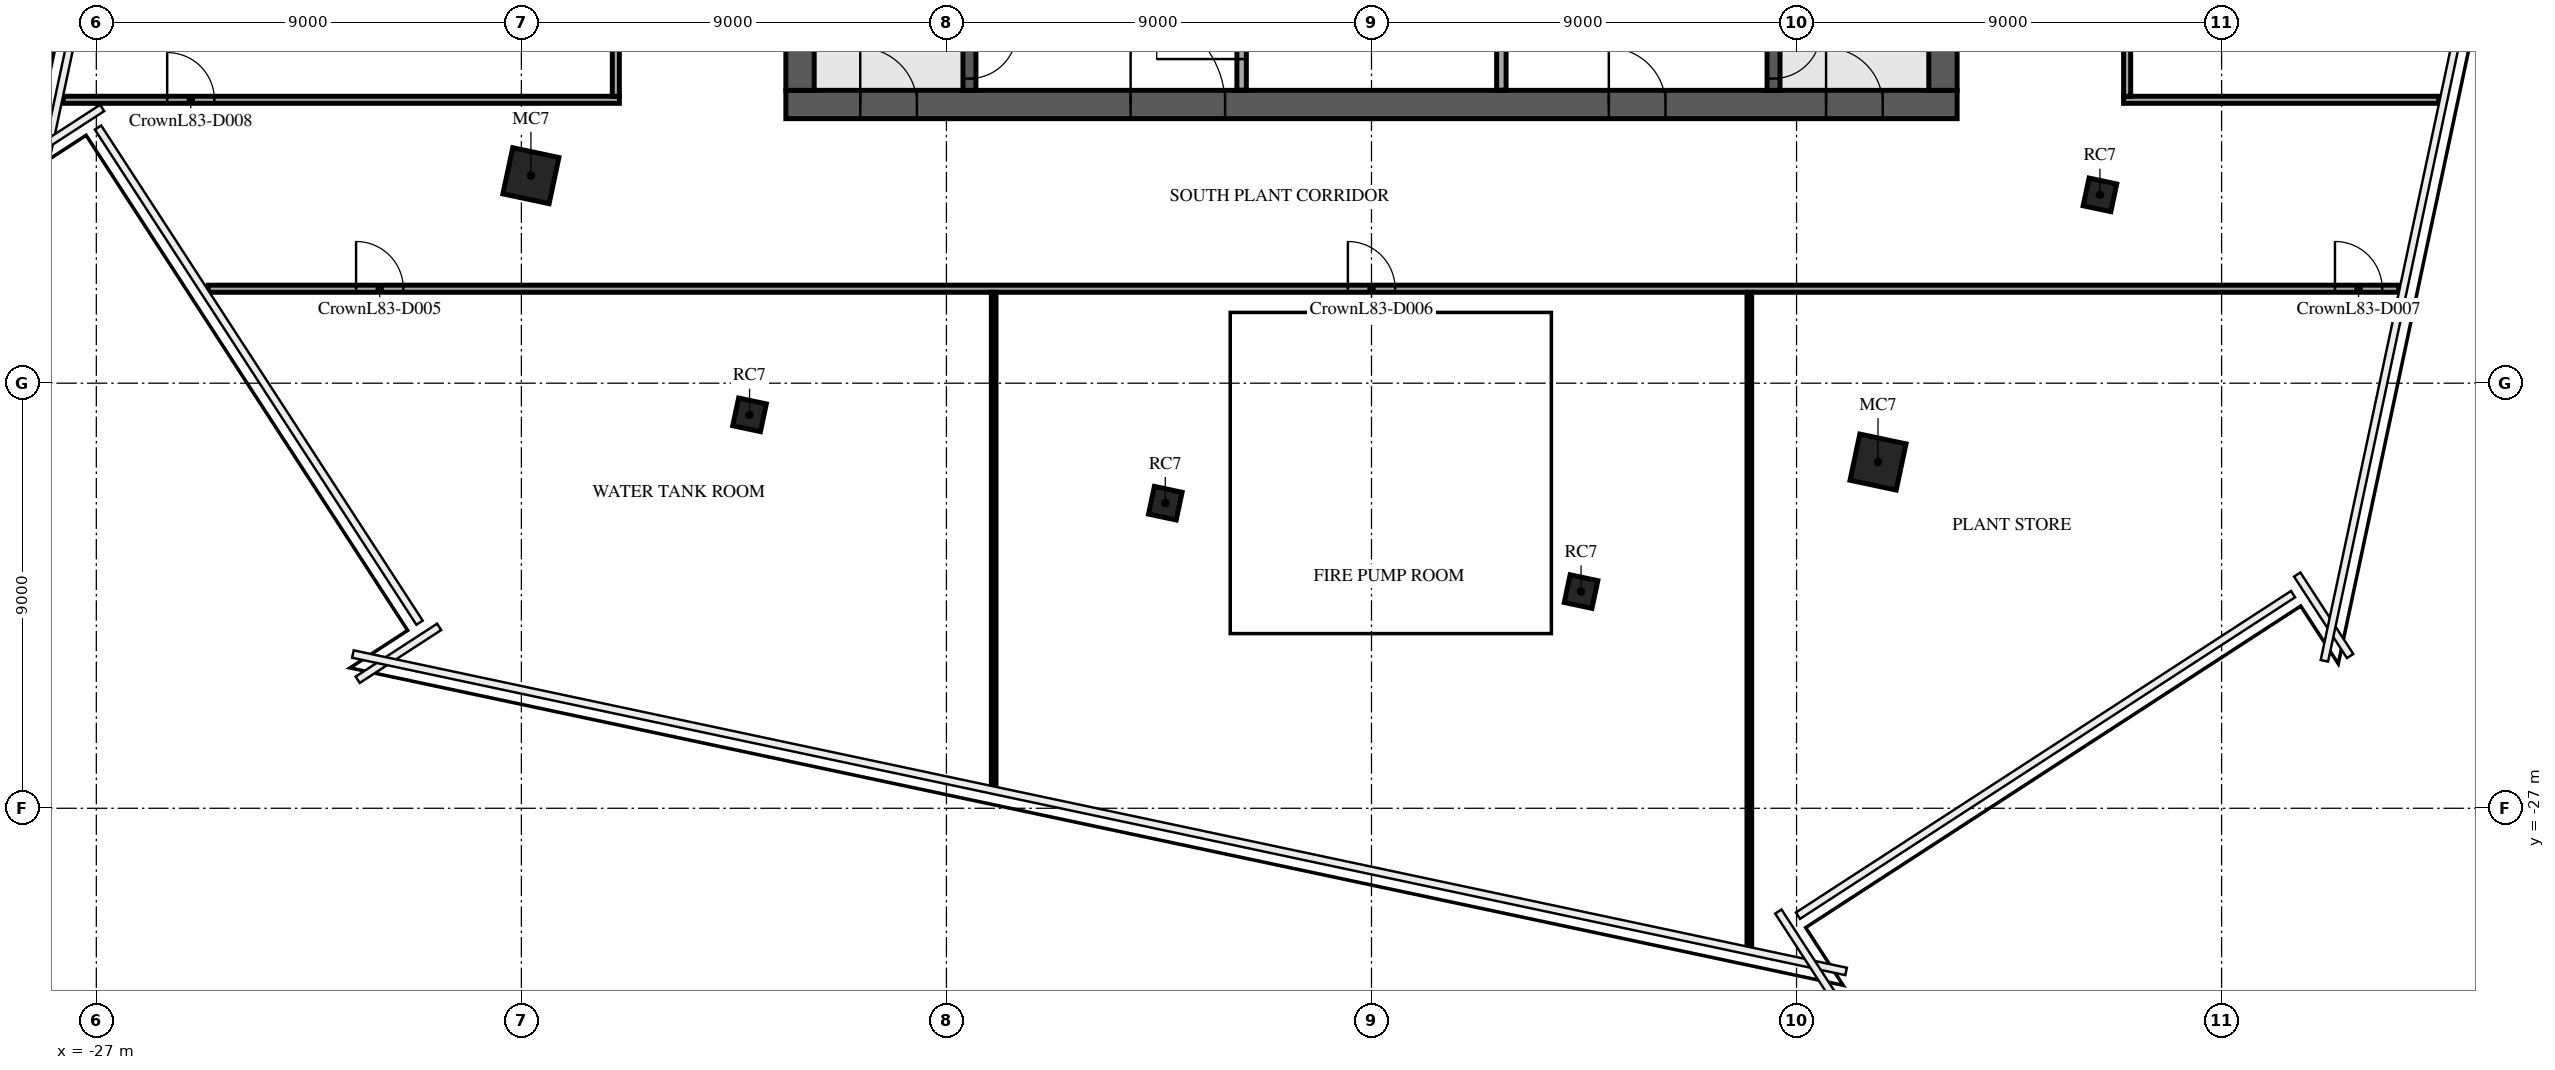
"""IFC4 building model, lengths in metres.
Left out: names, types, materials, properties, quantities, classifications, styles, units other than length and angle.
Written with IfcOpenShell. Run it as: python <this file> out.ifc"""

import sys

from ifc_helpers import new_model, si_unit, direction, frame, frame_2d, origin, origin_2d, place, context, subcontext, project, spatial, rectangle, extrude, element, fill, save


model = new_model("IFC4")
c1 = context("Model", 3, precision=1e-05, world=origin(), true_north=direction((0.0, 1.0)))
c2 = subcontext(c1, "Body", "Model", "MODEL_VIEW")
j1 = project(units=[si_unit("LENGTHUNIT", "METRE"), si_unit("PLANEANGLEUNIT", "RADIAN")], contexts=[c1])
p1 = place(None, origin())
s1 = spatial("IfcSite", under=j1, at=p1, CompositionType="ELEMENT")
p2 = place(p1, origin())
s2 = spatial("IfcBuilding", under=s1, at=p2, CompositionType="ELEMENT")
p3 = place(p2, frame((0.0, 0.0, 350.1)))
s3 = spatial("IfcBuildingStorey", under=s2, at=p3, CompositionType="ELEMENT", Elevation=350.1)
p4 = place(p3, frame((-17.798, -13.607, -0.3), z_axis=(0.0, 0.0, 1.0), x_axis=(0.207911690818, 0.978147600734, 0.0)))
e1 = element("IfcColumn", 1, at=p4, inside=s3, PredefinedType="COLUMN", context=c2, shape_type="SweptSolid", body=[
    extrude(rectangle(XDim=1.0, YDim=1.0, at=origin_2d()), origin(), (0.0, 0.0, 1.0), 8.3),
])
for number, where, z_axis, x_axis in (
    (2, (-13.169, -18.67, -0.3), (0.0, 0.0, 1.0), (0.208, 0.978, 0.0)),
    (3, (-4.366, -20.541, -0.3), (0.0, 0.0, 1.0), (0.208, 0.978, 0.0)),
    (4, (4.437, -22.412, -0.3), (0.0, 0.0, 1.0), (0.208, 0.978, 0.0)),
):
    element("IfcColumn", number, at=place(p3, frame(where, z_axis=z_axis, x_axis=x_axis)), inside=s3, PredefinedType="COLUMN", context=c2, shape_type="SweptSolid", body=[
        extrude(rectangle(XDim=0.6, YDim=0.6, at=origin_2d()), origin(), (0.0, 0.0, 1.0), 8.3),
    ])
p5 = place(p3, frame((10.725, -19.67, -0.3), z_axis=(0.0, 0.0, 1.0), x_axis=(0.207911690818, 0.978147600734, 0.0)))
e5 = element("IfcColumn", 5, at=p5, inside=s3, PredefinedType="COLUMN", context=c2, shape_type="SweptSolid", body=[
    extrude(rectangle(XDim=1.0, YDim=1.0, at=origin_2d()), origin(), (0.0, 0.0, 1.0), 8.3),
])
p6 = place(p3, frame((15.424, -14.013, -0.3), z_axis=(0.0, 0.0, 1.0), x_axis=(0.207911690818, 0.978147600734, 0.0)))
e6 = element("IfcColumn", 6, at=p6, inside=s3, PredefinedType="COLUMN", context=c2, shape_type="SweptSolid", body=[
    extrude(rectangle(XDim=0.6, YDim=0.6, at=origin_2d()), origin(), (0.0, 0.0, 1.0), 8.3),
])
p7 = place(p3, frame((-12.4, -12.1, 0.0), z_axis=(0.0, 0.0, 1.0), x_axis=(1.0, 0.0, 0.0)))
e7 = element("IfcWall", 7, at=p7, inside=s3, PredefinedType="SHEAR", context=c2, shape_type="SweptSolid", body=[
    extrude(rectangle(XDim=24.8, YDim=0.6, at=frame_2d((12.4, 0.0))), origin(), (0.0, 0.0, 1.0), 7.7),
])
p8 = place(p7, frame((7.3, 0.0, 0.0)))
e8 = element("IfcOpeningElement", 8, at=p8, cuts=e7, PredefinedType="OPENING", context=c2, shape_type="SweptSolid", body=[
    extrude(rectangle(XDim=2.0, YDim=2.1, at=frame_2d((1.0, 1.05))), frame((0.0, 0.31, 0.0), z_axis=(0.0, -1.0, 0.0), x_axis=(1.0, 0.0, 0.0)), (0.0, 0.0, 1.0), 0.62),
])
p9 = place(p7, frame((17.425, 0.0, 0.0)))
e9 = element("IfcOpeningElement", 9, at=p9, cuts=e7, PredefinedType="OPENING", context=c2, shape_type="SweptSolid", body=[
    extrude(rectangle(XDim=1.2, YDim=2.1, at=frame_2d((0.6, 1.05))), frame((0.0, 0.31, 0.0), z_axis=(0.0, -1.0, 0.0), x_axis=(1.0, 0.0, 0.0)), (0.0, 0.0, 1.0), 0.62),
])
p10 = place(p7, frame((1.575, 0.0, 0.0)))
e10 = element("IfcOpeningElement", 10, at=p10, cuts=e7, PredefinedType="OPENING", context=c2, shape_type="SweptSolid", body=[
    extrude(rectangle(XDim=1.2, YDim=2.1, at=frame_2d((0.6, 1.05))), frame((0.0, 0.31, 0.0), z_axis=(0.0, -1.0, 0.0), x_axis=(1.0, 0.0, 0.0)), (0.0, 0.0, 1.0), 0.62),
])
p11 = place(p7, frame((22.025, 0.0, 0.0)))
e11 = element("IfcOpeningElement", 11, at=p11, cuts=e7, PredefinedType="OPENING", context=c2, shape_type="SweptSolid", body=[
    extrude(rectangle(XDim=1.2, YDim=2.1, at=frame_2d((0.6, 1.05))), frame((0.0, 0.31, 0.0), z_axis=(0.0, -1.0, 0.0), x_axis=(1.0, 0.0, 0.0)), (0.0, 0.0, 1.0), 0.62),
])
p12 = place(p3, frame((12.1, -11.8, 0.0), z_axis=(0.0, 0.0, 1.0), x_axis=(0.0, 1.0, 0.0)))
e12 = element("IfcWall", 12, at=p12, inside=s3, PredefinedType="SHEAR", context=c2, shape_type="SweptSolid", body=[
    extrude(rectangle(XDim=23.6, YDim=0.6, at=frame_2d((11.8, 0.0))), origin(), (0.0, 0.0, 1.0), 7.7),
])
p13 = place(p12, frame((10.6, 0.0, 0.0)))
e13 = element("IfcOpeningElement", 13, at=p13, cuts=e12, PredefinedType="OPENING", context=c2, shape_type="SweptSolid", body=[
    extrude(rectangle(XDim=2.4, YDim=2.4, at=frame_2d((1.2, 1.2))), frame((0.0, 0.31, 0.0), z_axis=(0.0, -1.0, 0.0), x_axis=(1.0, 0.0, 0.0)), (0.0, 0.0, 1.0), 0.62),
])
p14 = place(p3, frame((-12.1, -11.8, 0.0), z_axis=(0.0, 0.0, 1.0), x_axis=(0.0, 1.0, 0.0)))
e14 = element("IfcWall", 14, at=p14, inside=s3, PredefinedType="SHEAR", context=c2, shape_type="SweptSolid", body=[
    extrude(rectangle(XDim=23.6, YDim=0.6, at=frame_2d((11.8, 0.0))), origin(), (0.0, 0.0, 1.0), 7.7),
])
p15 = place(p14, frame((10.6, 0.0, 0.0)))
e15 = element("IfcOpeningElement", 15, at=p15, cuts=e14, PredefinedType="OPENING", context=c2, shape_type="SweptSolid", body=[
    extrude(rectangle(XDim=2.4, YDim=2.4, at=frame_2d((1.2, 1.2))), frame((0.0, 0.31, 0.0), z_axis=(0.0, -1.0, 0.0), x_axis=(1.0, 0.0, 0.0)), (0.0, 0.0, 1.0), 0.62),
])
p16 = place(p3, frame((-8.512, -4.55, 0.0), z_axis=(0.0, 0.0, 1.0), x_axis=(0.0, -1.0, 0.0)))
e16 = element("IfcWall", 16, at=p16, inside=s3, PredefinedType="SOLIDWALL", context=c2, shape_type="SweptSolid", body=[
    extrude(rectangle(XDim=7.25, YDim=0.275, at=frame_2d((3.625, 0.0))), origin(), (0.0, 0.0, 1.0), 7.7),
])
p17 = place(p16, frame((6.0, 0.0, 0.0)))
e17 = element("IfcOpeningElement", 17, at=p17, cuts=e16, PredefinedType="OPENING", context=c2, shape_type="SweptSolid", body=[
    extrude(rectangle(XDim=1.0, YDim=2.1, at=frame_2d((0.5, 1.05))), frame((0.0, 0.147, 0.0), z_axis=(0.0, -1.0, 0.0), x_axis=(1.0, 0.0, 0.0)), (0.0, 0.0, 1.0), 0.295),
])
p18 = place(p3, frame((8.512, -4.55, 0.0), z_axis=(0.0, 0.0, 1.0), x_axis=(0.0, -1.0, 0.0)))
e18 = element("IfcWall", 18, at=p18, inside=s3, PredefinedType="SOLIDWALL", context=c2, shape_type="SweptSolid", body=[
    extrude(rectangle(XDim=7.25, YDim=0.275, at=frame_2d((3.625, 0.0))), origin(), (0.0, 0.0, 1.0), 7.7),
])
p19 = place(p18, frame((6.0, 0.0, 0.0)))
e19 = element("IfcOpeningElement", 19, at=p19, cuts=e18, PredefinedType="OPENING", context=c2, shape_type="SweptSolid", body=[
    extrude(rectangle(XDim=1.0, YDim=2.1, at=frame_2d((0.5, 1.05))), frame((0.0, 0.147, 0.0), z_axis=(0.0, -1.0, 0.0), x_axis=(1.0, 0.0, 0.0)), (0.0, 0.0, 1.0), 0.295),
])
p20 = place(p3, frame((-2.75, -11.795, 0.0), z_axis=(0.0, 0.0, 1.0), x_axis=(0.0, 1.0, 0.0)))
e20 = element("IfcWall", 20, at=p20, inside=s3, PredefinedType="PARTITIONING", context=c2, shape_type="SweptSolid", body=[
    extrude(rectangle(XDim=2.99, YDim=0.2, at=frame_2d((1.495, 0.0))), origin(), (0.0, 0.0, 1.0), 7.7),
])
p21 = place(p20, frame((0.657, 0.0, 0.0)))
e21 = element("IfcOpeningElement", 21, at=p21, cuts=e20, PredefinedType="OPENING", context=c2, shape_type="SweptSolid", body=[
    extrude(rectangle(XDim=1.8, YDim=2.1, at=frame_2d((0.9, 1.05))), frame((0.0, 0.11, 0.0), z_axis=(0.0, -1.0, 0.0), x_axis=(1.0, 0.0, 0.0)), (0.0, 0.0, 1.0), 0.22),
])
p22 = place(p3, frame((2.75, -11.795, 0.0), z_axis=(0.0, 0.0, 1.0), x_axis=(0.0, 1.0, 0.0)))
e22 = element("IfcWall", 22, at=p22, inside=s3, PredefinedType="PARTITIONING", context=c2, shape_type="SweptSolid", body=[
    extrude(rectangle(XDim=2.99, YDim=0.2, at=frame_2d((1.495, 0.0))), origin(), (0.0, 0.0, 1.0), 7.7),
])
p23 = place(p3, frame((-24.629, -16.0, 0.0), z_axis=(0.0, 0.0, 1.0), x_axis=(1.0, 0.0, 0.0)))
e23 = element("IfcWall", 23, at=p23, inside=s3, PredefinedType="PARTITIONING", context=c2, shape_type="SweptSolid", body=[
    extrude(rectangle(XDim=46.377, YDim=0.15, at=frame_2d((23.189, 0.0))), origin(), (0.0, 0.0, 1.0), 7.32),
])
p24 = place(p23, frame((3.129, 0.0, 0.0)))
e24 = element("IfcOpeningElement", 24, at=p24, cuts=e23, PredefinedType="OPENING", context=c2, shape_type="SweptSolid", body=[
    extrude(rectangle(XDim=1.0, YDim=2.1, at=frame_2d((0.5, 1.05))), frame((0.0, 0.085, 0.0), z_axis=(0.0, -1.0, 0.0), x_axis=(1.0, 0.0, 0.0)), (0.0, 0.0, 1.0), 0.17),
])
p25 = place(p23, frame((24.129, 0.0, 0.0)))
e25 = element("IfcOpeningElement", 25, at=p25, cuts=e23, PredefinedType="OPENING", context=c2, shape_type="SweptSolid", body=[
    extrude(rectangle(XDim=1.0, YDim=2.1, at=frame_2d((0.5, 1.05))), frame((0.0, 0.085, 0.0), z_axis=(0.0, -1.0, 0.0), x_axis=(1.0, 0.0, 0.0)), (0.0, 0.0, 1.0), 0.17),
])
p26 = place(p23, frame((45.029, 0.0, 0.0)))
e26 = element("IfcOpeningElement", 26, at=p26, cuts=e23, PredefinedType="OPENING", context=c2, shape_type="SweptSolid", body=[
    extrude(rectangle(XDim=1.0, YDim=2.1, at=frame_2d((0.5, 1.05))), frame((0.0, 0.085, 0.0), z_axis=(0.0, -1.0, 0.0), x_axis=(1.0, 0.0, 0.0)), (0.0, 0.0, 1.0), 0.17),
])
p27 = place(p3, frame((-27.7, -12.0, 0.0), z_axis=(0.0, 0.0, 1.0), x_axis=(1.0, 0.0, 0.0)))
e27 = element("IfcWall", 27, at=p27, inside=s3, PredefinedType="PARTITIONING", context=c2, shape_type="SweptSolid", body=[
    extrude(rectangle(XDim=11.775, YDim=0.15, at=frame_2d((5.888, 0.0))), origin(), (0.0, 0.0, 1.0), 7.7),
])
p28 = place(p27, frame((2.2, 0.0, 0.0)))
e28 = element("IfcOpeningElement", 28, at=p28, cuts=e27, PredefinedType="OPENING", context=c2, shape_type="SweptSolid", body=[
    extrude(rectangle(XDim=1.0, YDim=2.1, at=frame_2d((0.5, 1.05))), frame((0.0, 0.085, 0.0), z_axis=(0.0, -1.0, 0.0), x_axis=(1.0, 0.0, 0.0)), (0.0, 0.0, 1.0), 0.17),
])
p29 = place(p3, frame((15.925, -12.0, 0.0), z_axis=(0.0, 0.0, 1.0), x_axis=(1.0, 0.0, 0.0)))
e29 = element("IfcWall", 29, at=p29, inside=s3, PredefinedType="PARTITIONING", context=c2, shape_type="SweptSolid", body=[
    extrude(rectangle(XDim=6.674, YDim=0.15, at=frame_2d((3.337, 0.0))), origin(), (0.0, 0.0, 1.0), 7.7),
])
p30 = place(p3, frame((-16.0, -11.925, 0.0), z_axis=(0.0, 0.0, 1.0), x_axis=(0.0, 1.0, 0.0)))
e30 = element("IfcWall", 30, at=p30, inside=s3, PredefinedType="PARTITIONING", context=c2, shape_type="SweptSolid", body=[
    extrude(rectangle(XDim=11.875, YDim=0.15, at=frame_2d((5.938, 0.0))), origin(), (0.0, 0.0, 1.0), 7.7),
])
p31 = place(p3, frame((-8.0, -26.516, 0.0), z_axis=(0.0, 0.0, 1.0), x_axis=(0.0, 1.0, 0.0)))
e31 = element("IfcWall", 31, at=p31, inside=s3, PredefinedType="PARTITIONING", context=c2, shape_type="SweptSolid", body=[
    extrude(rectangle(XDim=10.441, YDim=0.1, at=frame_2d((5.221, 0.0))), origin(), (0.0, 0.0, 1.0), 7.7),
])
p32 = place(p3, frame((8.0, -29.917, 0.0), z_axis=(0.0, 0.0, 1.0), x_axis=(0.0, 1.0, 0.0)))
e32 = element("IfcWall", 32, at=p32, inside=s3, PredefinedType="PARTITIONING", context=c2, shape_type="SweptSolid", body=[
    extrude(rectangle(XDim=13.842, YDim=0.1, at=frame_2d((6.921, 0.0))), origin(), (0.0, 0.0, 1.0), 7.7),
])
p33 = place(p3, frame((16.0, -11.925, 0.0), z_axis=(0.0, 0.0, 1.0), x_axis=(0.0, 1.0, 0.0)))
e33 = element("IfcWall", 33, at=p33, inside=s3, PredefinedType="PARTITIONING", context=c2, shape_type="SweptSolid", body=[
    extrude(rectangle(XDim=23.85, YDim=0.15, at=frame_2d((11.925, 0.0))), origin(), (0.0, 0.0, 1.0), 7.32),
])
p34 = place(p33, frame((11.025, 0.0, 0.0)))
e34 = element("IfcOpeningElement", 34, at=p34, cuts=e33, PredefinedType="OPENING", context=c2, shape_type="SweptSolid", body=[
    extrude(rectangle(XDim=1.8, YDim=2.1, at=frame_2d((0.9, 1.05))), frame((0.0, 0.085, 0.0), z_axis=(0.0, -1.0, 0.0), x_axis=(1.0, 0.0, 0.0)), (0.0, 0.0, 1.0), 0.17),
])
p35 = place(p8, origin())
e35 = element("IfcDoor", 35, at=p35, inside=s3, OperationType="SINGLE_SWING_LEFT", PredefinedType="DOOR", context=c2, shape_type="SweptSolid", body=[
    extrude(rectangle(XDim=2.0, YDim=2.1, at=frame_2d((1.0, 1.05))), frame((0.0, 0.025, 0.0), z_axis=(0.0, -1.0, 0.0), x_axis=(1.0, 0.0, 0.0)), (0.0, 0.0, 1.0), 0.05),
])
fill(e8, e35)
p36 = place(p9, origin())
e36 = element("IfcDoor", 36, at=p36, inside=s3, OperationType="SINGLE_SWING_LEFT", PredefinedType="DOOR", context=c2, shape_type="SweptSolid", body=[
    extrude(rectangle(XDim=1.2, YDim=2.1, at=frame_2d((0.6, 1.05))), frame((0.0, 0.025, 0.0), z_axis=(0.0, -1.0, 0.0), x_axis=(1.0, 0.0, 0.0)), (0.0, 0.0, 1.0), 0.05),
])
fill(e9, e36)
p37 = place(p10, origin())
e37 = element("IfcDoor", 37, at=p37, inside=s3, OperationType="SINGLE_SWING_LEFT", PredefinedType="DOOR", context=c2, shape_type="SweptSolid", body=[
    extrude(rectangle(XDim=1.2, YDim=2.1, at=frame_2d((0.6, 1.05))), frame((0.0, 0.025, 0.0), z_axis=(0.0, -1.0, 0.0), x_axis=(1.0, 0.0, 0.0)), (0.0, 0.0, 1.0), 0.05),
])
fill(e10, e37)
p38 = place(p11, origin())
e38 = element("IfcDoor", 38, at=p38, inside=s3, OperationType="SINGLE_SWING_LEFT", PredefinedType="DOOR", context=c2, shape_type="SweptSolid", body=[
    extrude(rectangle(XDim=1.2, YDim=2.1, at=frame_2d((0.6, 1.05))), frame((0.0, 0.025, 0.0), z_axis=(0.0, -1.0, 0.0), x_axis=(1.0, 0.0, 0.0)), (0.0, 0.0, 1.0), 0.05),
])
fill(e11, e38)
p39 = place(p17, origin())
e39 = element("IfcDoor", 39, at=p39, inside=s3, OperationType="SINGLE_SWING_LEFT", PredefinedType="DOOR", context=c2, shape_type="SweptSolid", body=[
    extrude(rectangle(XDim=1.0, YDim=2.1, at=frame_2d((0.5, 1.05))), frame((0.0, 0.025, 0.0), z_axis=(0.0, -1.0, 0.0), x_axis=(1.0, 0.0, 0.0)), (0.0, 0.0, 1.0), 0.05),
])
fill(e17, e39)
p40 = place(p19, origin())
e40 = element("IfcDoor", 40, at=p40, inside=s3, OperationType="SINGLE_SWING_LEFT", PredefinedType="DOOR", context=c2, shape_type="SweptSolid", body=[
    extrude(rectangle(XDim=1.0, YDim=2.1, at=frame_2d((0.5, 1.05))), frame((0.0, 0.025, 0.0), z_axis=(0.0, -1.0, 0.0), x_axis=(1.0, 0.0, 0.0)), (0.0, 0.0, 1.0), 0.05),
])
fill(e19, e40)
p41 = place(p21, origin())
e41 = element("IfcDoor", 41, at=p41, inside=s3, OperationType="SINGLE_SWING_LEFT", PredefinedType="DOOR", context=c2, shape_type="SweptSolid", body=[
    extrude(rectangle(XDim=1.8, YDim=2.1, at=frame_2d((0.9, 1.05))), frame((0.0, 0.025, 0.0), z_axis=(0.0, -1.0, 0.0), x_axis=(1.0, 0.0, 0.0)), (0.0, 0.0, 1.0), 0.05),
])
fill(e21, e41)
p42 = place(p24, origin())
e42 = element("IfcDoor", 42, at=p42, inside=s3, OperationType="SINGLE_SWING_LEFT", PredefinedType="DOOR", context=c2, shape_type="SweptSolid", body=[
    extrude(rectangle(XDim=1.0, YDim=2.1, at=frame_2d((0.5, 1.05))), frame((0.0, 0.025, 0.0), z_axis=(0.0, -1.0, 0.0), x_axis=(1.0, 0.0, 0.0)), (0.0, 0.0, 1.0), 0.05),
])
fill(e24, e42)
p43 = place(p25, origin())
e43 = element("IfcDoor", 43, at=p43, inside=s3, OperationType="SINGLE_SWING_RIGHT", PredefinedType="DOOR", context=c2, shape_type="SweptSolid", body=[
    extrude(rectangle(XDim=1.0, YDim=2.1, at=frame_2d((0.5, 1.05))), frame((0.0, 0.025, 0.0), z_axis=(0.0, -1.0, 0.0), x_axis=(1.0, 0.0, 0.0)), (0.0, 0.0, 1.0), 0.05),
])
fill(e25, e43)
p44 = place(p26, origin())
e44 = element("IfcDoor", 44, at=p44, inside=s3, OperationType="SINGLE_SWING_LEFT", PredefinedType="DOOR", context=c2, shape_type="SweptSolid", body=[
    extrude(rectangle(XDim=1.0, YDim=2.1, at=frame_2d((0.5, 1.05))), frame((0.0, 0.025, 0.0), z_axis=(0.0, -1.0, 0.0), x_axis=(1.0, 0.0, 0.0)), (0.0, 0.0, 1.0), 0.05),
])
fill(e26, e44)
p45 = place(p28, origin())
e45 = element("IfcDoor", 45, at=p45, inside=s3, OperationType="SINGLE_SWING_RIGHT", PredefinedType="DOOR", context=c2, shape_type="SweptSolid", body=[
    extrude(rectangle(XDim=1.0, YDim=2.1, at=frame_2d((0.5, 1.05))), frame((0.0, 0.025, 0.0), z_axis=(0.0, -1.0, 0.0), x_axis=(1.0, 0.0, 0.0)), (0.0, 0.0, 1.0), 0.05),
])
fill(e28, e45)
save(model, sys.argv[1])
